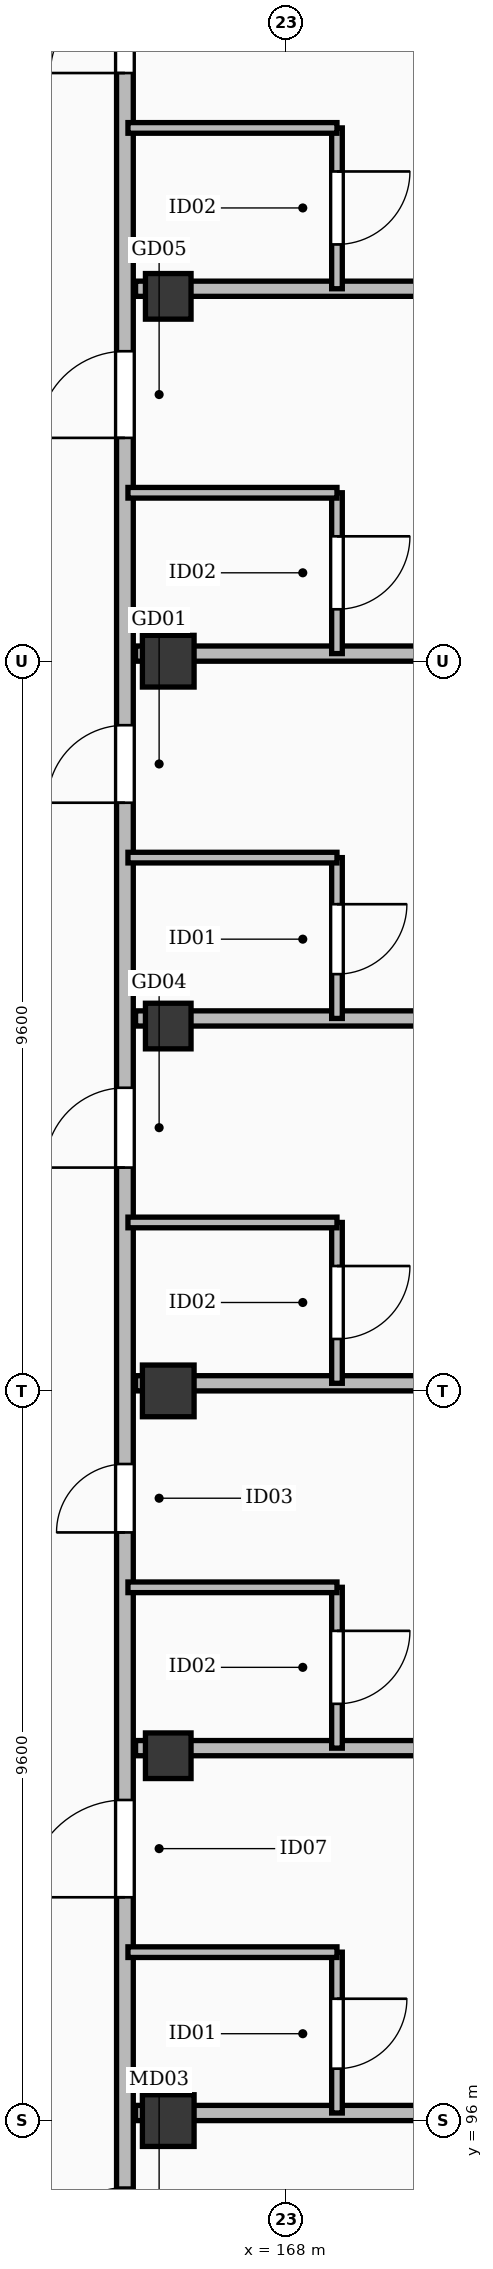
"""IFC4 building model, lengths in metres.
Left out: names, types, materials, properties, quantities, classifications, styles, units other than length and angle.
Written with IfcOpenShell. Run it as: python <this file> out.ifc"""

import sys

from ifc_helpers import new_model, si_unit, direction, frame, frame_2d, origin, origin_2d, place, context, subcontext, project, spatial, rectangle, extrude, element, fill, save


model = new_model("IFC4")
c1 = context("Model", 3, precision=1e-05, world=origin(), true_north=direction((0.0, 1.0)))
c2 = subcontext(c1, "Body", "Model", "MODEL_VIEW")
j1 = project(units=[si_unit("LENGTHUNIT", "METRE"), si_unit("PLANEANGLEUNIT", "RADIAN")], contexts=[c1])
p1 = place(None, origin())
s1 = spatial("IfcSite", under=j1, at=p1, CompositionType="ELEMENT")
p2 = place(p1, origin())
s2 = spatial("IfcBuilding", under=s1, at=p2, CompositionType="ELEMENT")
p3 = place(p2, frame((0.0, 0.0, 35.4)))
s3 = spatial("IfcBuildingStorey", under=s2, at=p3, CompositionType="ELEMENT", Elevation=35.4)
for number, where, z_axis, x_axis in (
    (1, (166.45, 96.0, 0.0), (0.0, 0.0, 1.0), (1.0, 0.0, 0.0)),
    (2, (166.45, 105.6, 0.0), (0.0, 0.0, 1.0), (1.0, 0.0, 0.0)),
    (3, (166.45, 115.2, 0.0), (0.0, 0.0, 1.0), (1.0, 0.0, 0.0)),
):
    element("IfcColumn", number, at=place(p3, frame(where, z_axis=z_axis, x_axis=x_axis)), inside=s3, PredefinedType="COLUMN", context=c2, shape_type="SweptSolid", body=[
        extrude(rectangle(XDim=0.68, YDim=0.68, at=origin_2d()), origin(), (0.0, 0.0, 1.0), 3.6),
    ])
for number, where, z_axis, x_axis in (
    (4, (166.45, 100.8, 0.0), (0.0, 0.0, 1.0), (1.0, 0.0, 0.0)),
    (5, (166.45, 110.4, 0.0), (0.0, 0.0, 1.0), (1.0, 0.0, 0.0)),
    (6, (166.45, 120.0, 0.0), (0.0, 0.0, 1.0), (1.0, 0.0, 0.0)),
):
    element("IfcColumn", number, at=place(p3, frame(where, z_axis=z_axis, x_axis=x_axis)), inside=s3, PredefinedType="COLUMN", context=c2, shape_type="SweptSolid", body=[
        extrude(rectangle(XDim=0.6, YDim=0.6, at=origin_2d()), origin(), (0.0, 0.0, 1.0), 3.6),
    ])
p4 = place(p3, frame((165.88, 53.15, 0.0), z_axis=(0.0, 0.0, 1.0), x_axis=(0.0, 1.0, 0.0)))
e7 = element("IfcWall", 7, at=p4, inside=s3, PredefinedType="PARTITIONING", context=c2, shape_type="SweptSolid", body=[
    extrude(rectangle(XDim=72.5, YDim=0.22, at=frame_2d((36.25, 0.0))), origin(), (0.0, 0.0, 1.0), 2.602),
])
p5 = place(p4, frame((0.691, 0.0, 0.0)))
e8 = element("IfcOpeningElement", 8, at=p5, cuts=e7, PredefinedType="OPENING", context=c2, shape_type="SweptSolid", body=[
    extrude(rectangle(XDim=1.02, YDim=2.2, at=frame_2d((0.51, 1.1))), frame((0.0, 0.122, 0.0), z_axis=(0.0, -1.0, 0.0), x_axis=(1.0, 0.0, 0.0)), (0.0, 0.0, 1.0), 0.244),
])
p6 = place(p4, frame((7.388, 0.0, 0.0)))
e9 = element("IfcOpeningElement", 9, at=p6, cuts=e7, PredefinedType="OPENING", context=c2, shape_type="SweptSolid", body=[
    extrude(rectangle(XDim=1.14, YDim=2.26, at=frame_2d((0.57, 1.13))), frame((0.0, 0.122, 0.0), z_axis=(0.0, -1.0, 0.0), x_axis=(1.0, 0.0, 0.0)), (0.0, 0.0, 1.0), 0.244),
])
p7 = place(p4, frame((12.188, 0.0, 0.0)))
e10 = element("IfcOpeningElement", 10, at=p7, cuts=e7, PredefinedType="OPENING", context=c2, shape_type="SweptSolid", body=[
    extrude(rectangle(XDim=0.98, YDim=2.15, at=frame_2d((0.49, 1.075))), frame((0.0, 0.122, 0.0), z_axis=(0.0, -1.0, 0.0), x_axis=(1.0, 0.0, 0.0)), (0.0, 0.0, 1.0), 0.244),
])
p8 = place(p4, frame((16.988, 0.0, 0.0)))
e11 = element("IfcOpeningElement", 11, at=p8, cuts=e7, PredefinedType="OPENING", context=c2, shape_type="SweptSolid", body=[
    extrude(rectangle(XDim=1.28, YDim=2.16, at=frame_2d((0.64, 1.08))), frame((0.0, 0.122, 0.0), z_axis=(0.0, -1.0, 0.0), x_axis=(1.0, 0.0, 0.0)), (0.0, 0.0, 1.0), 0.244),
])
p9 = place(p4, frame((21.788, 0.0, 0.0)))
e12 = element("IfcOpeningElement", 12, at=p9, cuts=e7, PredefinedType="OPENING", context=c2, shape_type="SweptSolid", body=[
    extrude(rectangle(XDim=0.9, YDim=2.08, at=frame_2d((0.45, 1.04))), frame((0.0, 0.122, 0.0), z_axis=(0.0, -1.0, 0.0), x_axis=(1.0, 0.0, 0.0)), (0.0, 0.0, 1.0), 0.244),
])
p10 = place(p4, frame((26.588, 0.0, 0.0)))
e13 = element("IfcOpeningElement", 13, at=p10, cuts=e7, PredefinedType="OPENING", context=c2, shape_type="SweptSolid", body=[
    extrude(rectangle(XDim=1.05, YDim=2.22, at=frame_2d((0.525, 1.11))), frame((0.0, 0.122, 0.0), z_axis=(0.0, -1.0, 0.0), x_axis=(1.0, 0.0, 0.0)), (0.0, 0.0, 1.0), 0.244),
])
p11 = place(p4, frame((31.388, 0.0, 0.0)))
e14 = element("IfcOpeningElement", 14, at=p11, cuts=e7, PredefinedType="OPENING", context=c2, shape_type="SweptSolid", body=[
    extrude(rectangle(XDim=1.02, YDim=2.2, at=frame_2d((0.51, 1.1))), frame((0.0, 0.122, 0.0), z_axis=(0.0, -1.0, 0.0), x_axis=(1.0, 0.0, 0.0)), (0.0, 0.0, 1.0), 0.244),
])
p12 = place(p4, frame((36.188, 0.0, 0.0)))
e15 = element("IfcOpeningElement", 15, at=p12, cuts=e7, PredefinedType="OPENING", context=c2, shape_type="SweptSolid", body=[
    extrude(rectangle(XDim=1.14, YDim=2.26, at=frame_2d((0.57, 1.13))), frame((0.0, 0.122, 0.0), z_axis=(0.0, -1.0, 0.0), x_axis=(1.0, 0.0, 0.0)), (0.0, 0.0, 1.0), 0.244),
])
p13 = place(p4, frame((40.988, 0.0, 0.0)))
e16 = element("IfcOpeningElement", 16, at=p13, cuts=e7, PredefinedType="OPENING", context=c2, shape_type="SweptSolid", body=[
    extrude(rectangle(XDim=0.98, YDim=2.15, at=frame_2d((0.49, 1.075))), frame((0.0, 0.122, 0.0), z_axis=(0.0, -1.0, 0.0), x_axis=(1.0, 0.0, 0.0)), (0.0, 0.0, 1.0), 0.244),
])
p14 = place(p4, frame((45.788, 0.0, 0.0)))
e17 = element("IfcOpeningElement", 17, at=p14, cuts=e7, PredefinedType="OPENING", context=c2, shape_type="SweptSolid", body=[
    extrude(rectangle(XDim=1.28, YDim=2.16, at=frame_2d((0.64, 1.08))), frame((0.0, 0.122, 0.0), z_axis=(0.0, -1.0, 0.0), x_axis=(1.0, 0.0, 0.0)), (0.0, 0.0, 1.0), 0.244),
])
p15 = place(p4, frame((50.588, 0.0, 0.0)))
e18 = element("IfcOpeningElement", 18, at=p15, cuts=e7, PredefinedType="OPENING", context=c2, shape_type="SweptSolid", body=[
    extrude(rectangle(XDim=0.9, YDim=2.08, at=frame_2d((0.45, 1.04))), frame((0.0, 0.122, 0.0), z_axis=(0.0, -1.0, 0.0), x_axis=(1.0, 0.0, 0.0)), (0.0, 0.0, 1.0), 0.244),
])
p16 = place(p4, frame((55.388, 0.0, 0.0)))
e19 = element("IfcOpeningElement", 19, at=p16, cuts=e7, PredefinedType="OPENING", context=c2, shape_type="SweptSolid", body=[
    extrude(rectangle(XDim=1.05, YDim=2.22, at=frame_2d((0.525, 1.11))), frame((0.0, 0.122, 0.0), z_axis=(0.0, -1.0, 0.0), x_axis=(1.0, 0.0, 0.0)), (0.0, 0.0, 1.0), 0.244),
])
p17 = place(p4, frame((60.188, 0.0, 0.0)))
e20 = element("IfcOpeningElement", 20, at=p17, cuts=e7, PredefinedType="OPENING", context=c2, shape_type="SweptSolid", body=[
    extrude(rectangle(XDim=1.02, YDim=2.2, at=frame_2d((0.51, 1.1))), frame((0.0, 0.122, 0.0), z_axis=(0.0, -1.0, 0.0), x_axis=(1.0, 0.0, 0.0)), (0.0, 0.0, 1.0), 0.244),
])
p18 = place(p4, frame((64.988, 0.0, 0.0)))
e21 = element("IfcOpeningElement", 21, at=p18, cuts=e7, PredefinedType="OPENING", context=c2, shape_type="SweptSolid", body=[
    extrude(rectangle(XDim=1.14, YDim=2.26, at=frame_2d((0.57, 1.13))), frame((0.0, 0.122, 0.0), z_axis=(0.0, -1.0, 0.0), x_axis=(1.0, 0.0, 0.0)), (0.0, 0.0, 1.0), 0.244),
])
p19 = place(p4, frame((69.788, 0.0, 0.0)))
e22 = element("IfcOpeningElement", 22, at=p19, cuts=e7, PredefinedType="OPENING", context=c2, shape_type="SweptSolid", body=[
    extrude(rectangle(XDim=0.98, YDim=2.15, at=frame_2d((0.49, 1.075))), frame((0.0, 0.122, 0.0), z_axis=(0.0, -1.0, 0.0), x_axis=(1.0, 0.0, 0.0)), (0.0, 0.0, 1.0), 0.244),
])
p20 = place(p3, frame((166.02, 96.1, 0.0), z_axis=(0.0, 0.0, 1.0), x_axis=(1.0, 0.0, 0.0)))
e23 = element("IfcWall", 23, at=p20, inside=s3, PredefinedType="PARTITIONING", context=c2, shape_type="SweptSolid", body=[
    extrude(rectangle(XDim=13.23, YDim=0.2, at=frame_2d((6.615, 0.0))), origin(), (0.0, 0.0, 1.0), 2.602),
])
p21 = place(p3, frame((168.67, 96.1, 0.0), z_axis=(0.0, 0.0, 1.0), x_axis=(0.0, 1.0, 0.0)))
e24 = element("IfcWall", 24, at=p21, inside=s3, PredefinedType="PARTITIONING", context=c2, shape_type="SweptSolid", body=[
    extrude(rectangle(XDim=2.116, YDim=0.14, at=frame_2d((1.058, 0.0))), origin(), (0.0, 0.0, 1.0), 2.732),
])
p22 = place(p21, frame((0.583, 0.0, 0.0)))
e25 = element("IfcOpeningElement", 25, at=p22, cuts=e24, PredefinedType="OPENING", context=c2, shape_type="SweptSolid", body=[
    extrude(rectangle(XDim=0.92, YDim=2.1, at=frame_2d((0.46, 1.05))), frame((0.0, 0.082, 0.0), z_axis=(0.0, -1.0, 0.0), x_axis=(1.0, 0.0, 0.0)), (0.0, 0.0, 1.0), 0.164),
])
p23 = place(p3, frame((165.92, 98.216, 0.0), z_axis=(0.0, 0.0, 1.0), x_axis=(1.0, 0.0, 0.0)))
e26 = element("IfcWall", 26, at=p23, inside=s3, PredefinedType="PARTITIONING", context=c2, shape_type="SweptSolid", body=[
    extrude(rectangle(XDim=2.75, YDim=0.14, at=frame_2d((1.375, 0.0))), origin(), (0.0, 0.0, 1.0), 2.732),
])
p24 = place(p3, frame((166.02, 100.9, 0.0), z_axis=(0.0, 0.0, 1.0), x_axis=(1.0, 0.0, 0.0)))
e27 = element("IfcWall", 27, at=p24, inside=s3, PredefinedType="PARTITIONING", context=c2, shape_type="SweptSolid", body=[
    extrude(rectangle(XDim=13.23, YDim=0.2, at=frame_2d((6.615, 0.0))), origin(), (0.0, 0.0, 1.0), 2.602),
])
p25 = place(p3, frame((168.67, 100.9, 0.0), z_axis=(0.0, 0.0, 1.0), x_axis=(0.0, 1.0, 0.0)))
e28 = element("IfcWall", 28, at=p25, inside=s3, PredefinedType="PARTITIONING", context=c2, shape_type="SweptSolid", body=[
    extrude(rectangle(XDim=2.116, YDim=0.14, at=frame_2d((1.058, 0.0))), origin(), (0.0, 0.0, 1.0), 2.732),
])
p26 = place(p25, frame((0.583, 0.0, 0.0)))
e29 = element("IfcOpeningElement", 29, at=p26, cuts=e28, PredefinedType="OPENING", context=c2, shape_type="SweptSolid", body=[
    extrude(rectangle(XDim=0.96, YDim=2.12, at=frame_2d((0.48, 1.06))), frame((0.0, 0.082, 0.0), z_axis=(0.0, -1.0, 0.0), x_axis=(1.0, 0.0, 0.0)), (0.0, 0.0, 1.0), 0.164),
])
p27 = place(p3, frame((165.92, 103.016, 0.0), z_axis=(0.0, 0.0, 1.0), x_axis=(1.0, 0.0, 0.0)))
e30 = element("IfcWall", 30, at=p27, inside=s3, PredefinedType="PARTITIONING", context=c2, shape_type="SweptSolid", body=[
    extrude(rectangle(XDim=2.75, YDim=0.14, at=frame_2d((1.375, 0.0))), origin(), (0.0, 0.0, 1.0), 2.732),
])
p28 = place(p3, frame((166.02, 105.7, 0.0), z_axis=(0.0, 0.0, 1.0), x_axis=(1.0, 0.0, 0.0)))
e31 = element("IfcWall", 31, at=p28, inside=s3, PredefinedType="PARTITIONING", context=c2, shape_type="SweptSolid", body=[
    extrude(rectangle(XDim=13.23, YDim=0.2, at=frame_2d((6.615, 0.0))), origin(), (0.0, 0.0, 1.0), 2.602),
])
p29 = place(p3, frame((168.67, 105.7, 0.0), z_axis=(0.0, 0.0, 1.0), x_axis=(0.0, 1.0, 0.0)))
e32 = element("IfcWall", 32, at=p29, inside=s3, PredefinedType="PARTITIONING", context=c2, shape_type="SweptSolid", body=[
    extrude(rectangle(XDim=2.116, YDim=0.14, at=frame_2d((1.058, 0.0))), origin(), (0.0, 0.0, 1.0), 2.732),
])
p30 = place(p29, frame((0.583, 0.0, 0.0)))
e33 = element("IfcOpeningElement", 33, at=p30, cuts=e32, PredefinedType="OPENING", context=c2, shape_type="SweptSolid", body=[
    extrude(rectangle(XDim=0.96, YDim=2.12, at=frame_2d((0.48, 1.06))), frame((0.0, 0.082, 0.0), z_axis=(0.0, -1.0, 0.0), x_axis=(1.0, 0.0, 0.0)), (0.0, 0.0, 1.0), 0.164),
])
p31 = place(p3, frame((165.92, 107.816, 0.0), z_axis=(0.0, 0.0, 1.0), x_axis=(1.0, 0.0, 0.0)))
e34 = element("IfcWall", 34, at=p31, inside=s3, PredefinedType="PARTITIONING", context=c2, shape_type="SweptSolid", body=[
    extrude(rectangle(XDim=2.75, YDim=0.14, at=frame_2d((1.375, 0.0))), origin(), (0.0, 0.0, 1.0), 2.732),
])
p32 = place(p3, frame((166.02, 110.5, 0.0), z_axis=(0.0, 0.0, 1.0), x_axis=(1.0, 0.0, 0.0)))
e35 = element("IfcWall", 35, at=p32, inside=s3, PredefinedType="PARTITIONING", context=c2, shape_type="SweptSolid", body=[
    extrude(rectangle(XDim=13.23, YDim=0.2, at=frame_2d((6.615, 0.0))), origin(), (0.0, 0.0, 1.0), 2.602),
])
p33 = place(p3, frame((168.67, 110.5, 0.0), z_axis=(0.0, 0.0, 1.0), x_axis=(0.0, 1.0, 0.0)))
e36 = element("IfcWall", 36, at=p33, inside=s3, PredefinedType="PARTITIONING", context=c2, shape_type="SweptSolid", body=[
    extrude(rectangle(XDim=2.116, YDim=0.14, at=frame_2d((1.058, 0.0))), origin(), (0.0, 0.0, 1.0), 2.732),
])
p34 = place(p33, frame((0.583, 0.0, 0.0)))
e37 = element("IfcOpeningElement", 37, at=p34, cuts=e36, PredefinedType="OPENING", context=c2, shape_type="SweptSolid", body=[
    extrude(rectangle(XDim=0.92, YDim=2.1, at=frame_2d((0.46, 1.05))), frame((0.0, 0.082, 0.0), z_axis=(0.0, -1.0, 0.0), x_axis=(1.0, 0.0, 0.0)), (0.0, 0.0, 1.0), 0.164),
])
p35 = place(p3, frame((165.92, 112.616, 0.0), z_axis=(0.0, 0.0, 1.0), x_axis=(1.0, 0.0, 0.0)))
e38 = element("IfcWall", 38, at=p35, inside=s3, PredefinedType="PARTITIONING", context=c2, shape_type="SweptSolid", body=[
    extrude(rectangle(XDim=2.75, YDim=0.14, at=frame_2d((1.375, 0.0))), origin(), (0.0, 0.0, 1.0), 2.732),
])
p36 = place(p3, frame((166.02, 115.3, 0.0), z_axis=(0.0, 0.0, 1.0), x_axis=(1.0, 0.0, 0.0)))
e39 = element("IfcWall", 39, at=p36, inside=s3, PredefinedType="PARTITIONING", context=c2, shape_type="SweptSolid", body=[
    extrude(rectangle(XDim=13.23, YDim=0.2, at=frame_2d((6.615, 0.0))), origin(), (0.0, 0.0, 1.0), 2.602),
])
p37 = place(p3, frame((168.67, 115.3, 0.0), z_axis=(0.0, 0.0, 1.0), x_axis=(0.0, 1.0, 0.0)))
e40 = element("IfcWall", 40, at=p37, inside=s3, PredefinedType="PARTITIONING", context=c2, shape_type="SweptSolid", body=[
    extrude(rectangle(XDim=2.116, YDim=0.14, at=frame_2d((1.058, 0.0))), origin(), (0.0, 0.0, 1.0), 2.732),
])
p38 = place(p37, frame((0.583, 0.0, 0.0)))
e41 = element("IfcOpeningElement", 41, at=p38, cuts=e40, PredefinedType="OPENING", context=c2, shape_type="SweptSolid", body=[
    extrude(rectangle(XDim=0.96, YDim=2.12, at=frame_2d((0.48, 1.06))), frame((0.0, 0.082, 0.0), z_axis=(0.0, -1.0, 0.0), x_axis=(1.0, 0.0, 0.0)), (0.0, 0.0, 1.0), 0.164),
])
p39 = place(p3, frame((165.92, 117.416, 0.0), z_axis=(0.0, 0.0, 1.0), x_axis=(1.0, 0.0, 0.0)))
e42 = element("IfcWall", 42, at=p39, inside=s3, PredefinedType="PARTITIONING", context=c2, shape_type="SweptSolid", body=[
    extrude(rectangle(XDim=2.75, YDim=0.14, at=frame_2d((1.375, 0.0))), origin(), (0.0, 0.0, 1.0), 2.732),
])
p40 = place(p3, frame((166.02, 120.1, 0.0), z_axis=(0.0, 0.0, 1.0), x_axis=(1.0, 0.0, 0.0)))
e43 = element("IfcWall", 43, at=p40, inside=s3, PredefinedType="PARTITIONING", context=c2, shape_type="SweptSolid", body=[
    extrude(rectangle(XDim=13.23, YDim=0.2, at=frame_2d((6.615, 0.0))), origin(), (0.0, 0.0, 1.0), 2.602),
])
p41 = place(p3, frame((168.67, 120.1, 0.0), z_axis=(0.0, 0.0, 1.0), x_axis=(0.0, 1.0, 0.0)))
e44 = element("IfcWall", 44, at=p41, inside=s3, PredefinedType="PARTITIONING", context=c2, shape_type="SweptSolid", body=[
    extrude(rectangle(XDim=2.116, YDim=0.14, at=frame_2d((1.058, 0.0))), origin(), (0.0, 0.0, 1.0), 2.732),
])
p42 = place(p41, frame((0.583, 0.0, 0.0)))
e45 = element("IfcOpeningElement", 45, at=p42, cuts=e44, PredefinedType="OPENING", context=c2, shape_type="SweptSolid", body=[
    extrude(rectangle(XDim=0.96, YDim=2.12, at=frame_2d((0.48, 1.06))), frame((0.0, 0.082, 0.0), z_axis=(0.0, -1.0, 0.0), x_axis=(1.0, 0.0, 0.0)), (0.0, 0.0, 1.0), 0.164),
])
p43 = place(p3, frame((165.92, 122.216, 0.0), z_axis=(0.0, 0.0, 1.0), x_axis=(1.0, 0.0, 0.0)))
e46 = element("IfcWall", 46, at=p43, inside=s3, PredefinedType="PARTITIONING", context=c2, shape_type="SweptSolid", body=[
    extrude(rectangle(XDim=2.75, YDim=0.14, at=frame_2d((1.375, 0.0))), origin(), (0.0, 0.0, 1.0), 2.732),
])
p44 = place(p13, origin())
e47 = element("IfcDoor", 47, at=p44, inside=s3, OperationType="SINGLE_SWING_LEFT", PredefinedType="DOOR", context=c2, shape_type="SweptSolid", body=[
    extrude(rectangle(XDim=0.98, YDim=2.15, at=frame_2d((0.49, 1.075))), frame((0.0, 0.025, 0.0), z_axis=(0.0, -1.0, 0.0), x_axis=(1.0, 0.0, 0.0)), (0.0, 0.0, 1.0), 0.05),
])
fill(e16, e47)
p45 = place(p14, origin())
e48 = element("IfcDoor", 48, at=p45, inside=s3, OperationType="SINGLE_SWING_LEFT", PredefinedType="DOOR", context=c2, shape_type="SweptSolid", body=[
    extrude(rectangle(XDim=1.28, YDim=2.16, at=frame_2d((0.64, 1.08))), frame((0.0, 0.025, 0.0), z_axis=(0.0, -1.0, 0.0), x_axis=(1.0, 0.0, 0.0)), (0.0, 0.0, 1.0), 0.05),
])
fill(e17, e48)
p46 = place(p22, frame((0.92, 0.0, 0.0), z_axis=(0.0, 0.0, 1.0), x_axis=(-1.0, 0.0, 0.0)))
e49 = element("IfcDoor", 49, at=p46, inside=s3, OperationType="SINGLE_SWING_RIGHT", PredefinedType="DOOR", context=c2, shape_type="SweptSolid", body=[
    extrude(rectangle(XDim=0.92, YDim=2.1, at=frame_2d((0.46, 1.05))), frame((0.0, 0.025, 0.0), z_axis=(0.0, -1.0, 0.0), x_axis=(1.0, 0.0, 0.0)), (0.0, 0.0, 1.0), 0.05),
])
fill(e25, e49)
p47 = place(p15, origin())
e50 = element("IfcDoor", 50, at=p47, inside=s3, OperationType="SINGLE_SWING_LEFT", PredefinedType="DOOR", context=c2, shape_type="SweptSolid", body=[
    extrude(rectangle(XDim=0.9, YDim=2.08, at=frame_2d((0.45, 1.04))), frame((0.0, 0.025, 0.0), z_axis=(0.0, -1.0, 0.0), x_axis=(1.0, 0.0, 0.0)), (0.0, 0.0, 1.0), 0.05),
])
fill(e18, e50)
p48 = place(p26, frame((0.96, 0.0, 0.0), z_axis=(0.0, 0.0, 1.0), x_axis=(-1.0, 0.0, 0.0)))
e51 = element("IfcDoor", 51, at=p48, inside=s3, OperationType="SINGLE_SWING_RIGHT", PredefinedType="DOOR", context=c2, shape_type="SweptSolid", body=[
    extrude(rectangle(XDim=0.96, YDim=2.12, at=frame_2d((0.48, 1.06))), frame((0.0, 0.025, 0.0), z_axis=(0.0, -1.0, 0.0), x_axis=(1.0, 0.0, 0.0)), (0.0, 0.0, 1.0), 0.05),
])
fill(e29, e51)
p49 = place(p16, origin())
e52 = element("IfcDoor", 52, at=p49, inside=s3, OperationType="SINGLE_SWING_LEFT", PredefinedType="DOOR", context=c2, shape_type="SweptSolid", body=[
    extrude(rectangle(XDim=1.05, YDim=2.22, at=frame_2d((0.525, 1.11))), frame((0.0, 0.025, 0.0), z_axis=(0.0, -1.0, 0.0), x_axis=(1.0, 0.0, 0.0)), (0.0, 0.0, 1.0), 0.05),
])
fill(e19, e52)
p50 = place(p30, frame((0.96, 0.0, 0.0), z_axis=(0.0, 0.0, 1.0), x_axis=(-1.0, 0.0, 0.0)))
e53 = element("IfcDoor", 53, at=p50, inside=s3, OperationType="SINGLE_SWING_RIGHT", PredefinedType="DOOR", context=c2, shape_type="SweptSolid", body=[
    extrude(rectangle(XDim=0.96, YDim=2.12, at=frame_2d((0.48, 1.06))), frame((0.0, 0.025, 0.0), z_axis=(0.0, -1.0, 0.0), x_axis=(1.0, 0.0, 0.0)), (0.0, 0.0, 1.0), 0.05),
])
fill(e33, e53)
p51 = place(p17, origin())
e54 = element("IfcDoor", 54, at=p51, inside=s3, OperationType="SINGLE_SWING_LEFT", PredefinedType="DOOR", context=c2, shape_type="SweptSolid", body=[
    extrude(rectangle(XDim=1.02, YDim=2.2, at=frame_2d((0.51, 1.1))), frame((0.0, 0.025, 0.0), z_axis=(0.0, -1.0, 0.0), x_axis=(1.0, 0.0, 0.0)), (0.0, 0.0, 1.0), 0.05),
])
fill(e20, e54)
p52 = place(p34, frame((0.92, 0.0, 0.0), z_axis=(0.0, 0.0, 1.0), x_axis=(-1.0, 0.0, 0.0)))
e55 = element("IfcDoor", 55, at=p52, inside=s3, OperationType="SINGLE_SWING_RIGHT", PredefinedType="DOOR", context=c2, shape_type="SweptSolid", body=[
    extrude(rectangle(XDim=0.92, YDim=2.1, at=frame_2d((0.46, 1.05))), frame((0.0, 0.025, 0.0), z_axis=(0.0, -1.0, 0.0), x_axis=(1.0, 0.0, 0.0)), (0.0, 0.0, 1.0), 0.05),
])
fill(e37, e55)
p53 = place(p18, origin())
e56 = element("IfcDoor", 56, at=p53, inside=s3, OperationType="SINGLE_SWING_LEFT", PredefinedType="DOOR", context=c2, shape_type="SweptSolid", body=[
    extrude(rectangle(XDim=1.14, YDim=2.26, at=frame_2d((0.57, 1.13))), frame((0.0, 0.025, 0.0), z_axis=(0.0, -1.0, 0.0), x_axis=(1.0, 0.0, 0.0)), (0.0, 0.0, 1.0), 0.05),
])
fill(e21, e56)
p54 = place(p38, frame((0.96, 0.0, 0.0), z_axis=(0.0, 0.0, 1.0), x_axis=(-1.0, 0.0, 0.0)))
e57 = element("IfcDoor", 57, at=p54, inside=s3, OperationType="SINGLE_SWING_RIGHT", PredefinedType="DOOR", context=c2, shape_type="SweptSolid", body=[
    extrude(rectangle(XDim=0.96, YDim=2.12, at=frame_2d((0.48, 1.06))), frame((0.0, 0.025, 0.0), z_axis=(0.0, -1.0, 0.0), x_axis=(1.0, 0.0, 0.0)), (0.0, 0.0, 1.0), 0.05),
])
fill(e41, e57)
p55 = place(p19, origin())
e58 = element("IfcDoor", 58, at=p55, inside=s3, OperationType="SINGLE_SWING_LEFT", PredefinedType="DOOR", context=c2, shape_type="SweptSolid", body=[
    extrude(rectangle(XDim=0.98, YDim=2.15, at=frame_2d((0.49, 1.075))), frame((0.0, 0.025, 0.0), z_axis=(0.0, -1.0, 0.0), x_axis=(1.0, 0.0, 0.0)), (0.0, 0.0, 1.0), 0.05),
])
fill(e22, e58)
p56 = place(p42, frame((0.96, 0.0, 0.0), z_axis=(0.0, 0.0, 1.0), x_axis=(-1.0, 0.0, 0.0)))
e59 = element("IfcDoor", 59, at=p56, inside=s3, OperationType="SINGLE_SWING_RIGHT", PredefinedType="DOOR", context=c2, shape_type="SweptSolid", body=[
    extrude(rectangle(XDim=0.96, YDim=2.12, at=frame_2d((0.48, 1.06))), frame((0.0, 0.025, 0.0), z_axis=(0.0, -1.0, 0.0), x_axis=(1.0, 0.0, 0.0)), (0.0, 0.0, 1.0), 0.05),
])
fill(e45, e59)
save(model, sys.argv[1])
